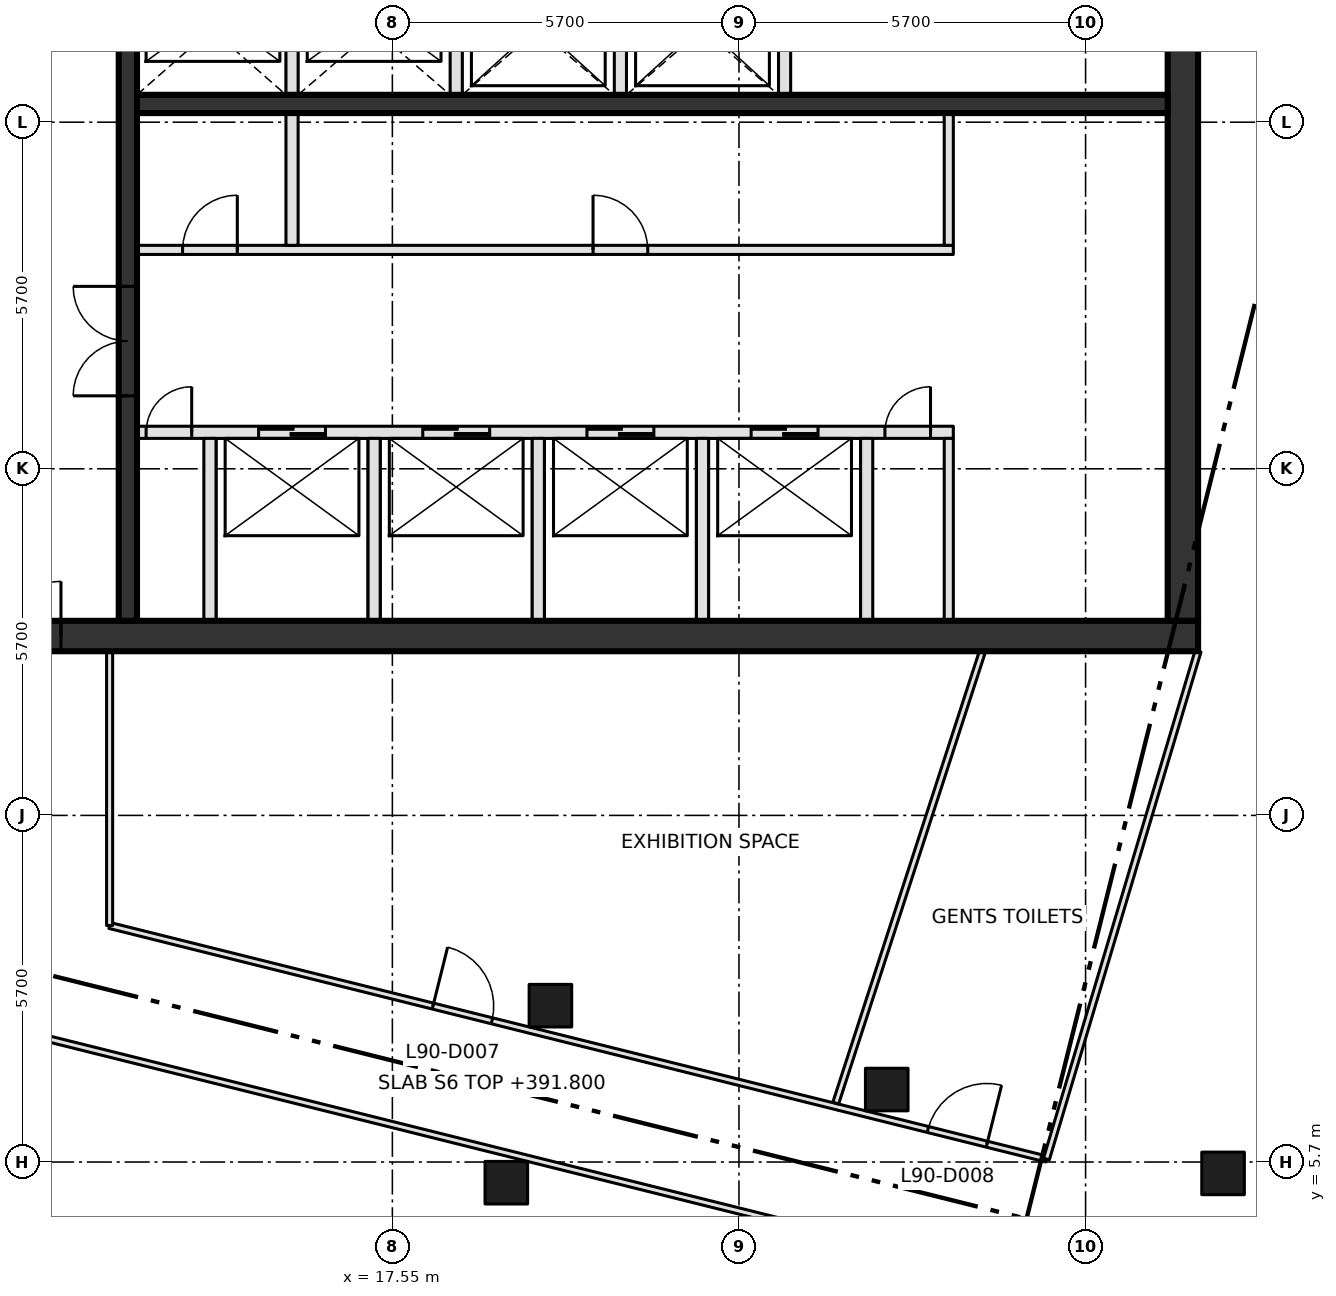
"""IFC4 building model, lengths in metres.
Left out: names, types, materials, properties, quantities, classifications, styles, units other than length and angle.
Written with IfcOpenShell. Run it as: python <this file> out.ifc"""

import sys

from ifc_helpers import new_model, si_unit, direction, frame, frame_2d, origin, origin_2d, place, context, subcontext, project, spatial, rectangle, extrude, element, fill, save


model = new_model("IFC4")
c1 = context("Model", 3, precision=1e-05, world=origin(), true_north=direction((0.0, 1.0)))
c2 = subcontext(c1, "Body", "Model", "MODEL_VIEW")
j1 = project(units=[si_unit("LENGTHUNIT", "METRE"), si_unit("PLANEANGLEUNIT", "RADIAN")], contexts=[c1])
p1 = place(None, origin())
s1 = spatial("IfcSite", under=j1, at=p1, CompositionType="ELEMENT")
p2 = place(p1, origin())
s2 = spatial("IfcBuilding", under=s1, at=p2, CompositionType="ELEMENT")
p3 = place(p2, frame((0.0, 0.0, 391.8)))
s3 = spatial("IfcBuildingStorey", under=s2, at=p3, CompositionType="ELEMENT", Elevation=391.8)
for number, where, z_axis, x_axis in (
    (1, (19.424, 5.36, 0.0), (0.0, 0.0, 1.0), (1.0, 0.0, 0.0)),
    (2, (20.149, 8.271, 0.0), (0.0, 0.0, 1.0), (1.0, 0.0, 0.0)),
    (3, (25.68, 6.892, 0.0), (0.0, 0.0, 1.0), (1.0, 0.0, 0.0)),
    (4, (31.211, 5.513, 0.0), (0.0, 0.0, 1.0), (1.0, 0.0, 0.0)),
):
    element("IfcColumn", number, at=place(p3, frame(where, z_axis=z_axis, x_axis=x_axis)), inside=s3, PredefinedType="COLUMN", context=c2, shape_type="SweptSolid", body=[
        extrude(rectangle(XDim=0.7, YDim=0.7, at=origin_2d()), origin(), (0.0, 0.0, 1.0), 4.2),
    ])
p4 = place(p3, frame((8.0, 14.35, -0.3), z_axis=(0.0, 0.0, 1.0), x_axis=(1.0, 0.0, 0.0)))
e5 = element("IfcWall", 5, at=p4, inside=s3, PredefinedType="SHEAR", context=c2, shape_type="SweptSolid", body=[
    extrude(rectangle(XDim=22.8, YDim=0.5, at=frame_2d((11.4, 0.0))), origin(), (0.0, 0.0, 1.0), 4.2),
])
p5 = place(p4, frame((2.3, 0.0, 0.3)))
e6 = element("IfcOpeningElement", 6, at=p5, cuts=e5, PredefinedType="OPENING", context=c2, shape_type="SweptSolid", body=[
    extrude(rectangle(XDim=1.8, YDim=2.1, at=frame_2d((0.9, 1.05))), frame((0.0, 0.26, 0.0), z_axis=(0.0, -1.0, 0.0), x_axis=(1.0, 0.0, 0.0)), (0.0, 0.0, 1.0), 0.52),
])
p6 = place(p3, frame((30.55, 14.6, -0.3), z_axis=(0.0, 0.0, 1.0), x_axis=(0.0, 1.0, 0.0)))
e7 = element("IfcWall", 7, at=p6, inside=s3, PredefinedType="SHEAR", context=c2, shape_type="SweptSolid", body=[
    extrude(rectangle(XDim=21.1, YDim=0.5, at=frame_2d((10.55, 0.0))), origin(), (0.0, 0.0, 1.0), 4.2),
])
p7 = place(p3, frame((13.35, 17.7, 0.0), z_axis=(0.0, 0.0, 1.0), x_axis=(1.0, 0.0, 0.0)))
e8 = element("IfcWall", 8, at=p7, inside=s3, PredefinedType="SOLIDWALL", context=c2, shape_type="SweptSolid", body=[
    extrude(rectangle(XDim=13.425, YDim=0.2, at=frame_2d((6.712, 0.0))), origin(), (0.0, 0.0, 1.0), 3.9),
])
p8 = place(p7, frame((2.0, 0.0, 0.0)))
e9 = element("IfcOpeningElement", 9, at=p8, cuts=e8, PredefinedType="OPENING", context=c2, shape_type="SweptSolid", body=[
    extrude(rectangle(XDim=1.1, YDim=2.1, at=frame_2d((0.55, 1.05))), frame((0.0, 0.11, 0.0), z_axis=(0.0, -1.0, 0.0), x_axis=(1.0, 0.0, 0.0)), (0.0, 0.0, 1.0), 0.22),
])
p9 = place(p7, frame((4.7, 0.0, 0.0)))
e10 = element("IfcOpeningElement", 10, at=p9, cuts=e8, PredefinedType="OPENING", context=c2, shape_type="SweptSolid", body=[
    extrude(rectangle(XDim=1.1, YDim=2.1, at=frame_2d((0.55, 1.05))), frame((0.0, 0.11, 0.0), z_axis=(0.0, -1.0, 0.0), x_axis=(1.0, 0.0, 0.0)), (0.0, 0.0, 1.0), 0.22),
])
p10 = place(p7, frame((7.4, 0.0, 0.0)))
e11 = element("IfcOpeningElement", 11, at=p10, cuts=e8, PredefinedType="OPENING", context=c2, shape_type="SweptSolid", body=[
    extrude(rectangle(XDim=1.1, YDim=2.1, at=frame_2d((0.55, 1.05))), frame((0.0, 0.11, 0.0), z_axis=(0.0, -1.0, 0.0), x_axis=(1.0, 0.0, 0.0)), (0.0, 0.0, 1.0), 0.22),
])
p11 = place(p7, frame((10.1, 0.0, 0.0)))
e12 = element("IfcOpeningElement", 12, at=p11, cuts=e8, PredefinedType="OPENING", context=c2, shape_type="SweptSolid", body=[
    extrude(rectangle(XDim=1.1, YDim=2.1, at=frame_2d((0.55, 1.05))), frame((0.0, 0.11, 0.0), z_axis=(0.0, -1.0, 0.0), x_axis=(1.0, 0.0, 0.0)), (0.0, 0.0, 1.0), 0.22),
])
p12 = place(p7, frame((0.15, 0.0, 0.0)))
e13 = element("IfcOpeningElement", 13, at=p12, cuts=e8, PredefinedType="OPENING", context=c2, shape_type="SweptSolid", body=[
    extrude(rectangle(XDim=0.75, YDim=2.1, at=frame_2d((0.375, 1.05))), frame((0.0, 0.11, 0.0), z_axis=(0.0, -1.0, 0.0), x_axis=(1.0, 0.0, 0.0)), (0.0, 0.0, 1.0), 0.22),
])
p13 = place(p7, frame((12.3, 0.0, 0.0)))
e14 = element("IfcOpeningElement", 14, at=p13, cuts=e8, PredefinedType="OPENING", context=c2, shape_type="SweptSolid", body=[
    extrude(rectangle(XDim=0.75, YDim=2.1, at=frame_2d((0.375, 1.05))), frame((0.0, 0.11, 0.0), z_axis=(0.0, -1.0, 0.0), x_axis=(1.0, 0.0, 0.0)), (0.0, 0.0, 1.0), 0.22),
])
p14 = place(p3, frame((13.35, 20.7, 0.0), z_axis=(0.0, 0.0, 1.0), x_axis=(1.0, 0.0, 0.0)))
e15 = element("IfcWall", 15, at=p14, inside=s3, PredefinedType="PARTITIONING", context=c2, shape_type="SweptSolid", body=[
    extrude(rectangle(XDim=13.425, YDim=0.15, at=frame_2d((6.712, 0.0))), origin(), (0.0, 0.0, 1.0), 3.9),
])
p15 = place(p14, frame((0.75, 0.0, 0.0)))
e16 = element("IfcOpeningElement", 16, at=p15, cuts=e15, PredefinedType="OPENING", context=c2, shape_type="SweptSolid", body=[
    extrude(rectangle(XDim=0.9, YDim=2.1, at=frame_2d((0.45, 1.05))), frame((0.0, 0.085, 0.0), z_axis=(0.0, -1.0, 0.0), x_axis=(1.0, 0.0, 0.0)), (0.0, 0.0, 1.0), 0.17),
])
p16 = place(p14, frame((7.5, 0.0, 0.0)))
e17 = element("IfcOpeningElement", 17, at=p16, cuts=e15, PredefinedType="OPENING", context=c2, shape_type="SweptSolid", body=[
    extrude(rectangle(XDim=0.9, YDim=2.1, at=frame_2d((0.45, 1.05))), frame((0.0, 0.085, 0.0), z_axis=(0.0, -1.0, 0.0), x_axis=(1.0, 0.0, 0.0)), (0.0, 0.0, 1.0), 0.17),
])
p17 = place(p3, frame((13.35, 23.1, 0.0), z_axis=(0.0, 0.0, 1.0), x_axis=(1.0, 0.0, 0.0)))
e18 = element("IfcWall", 18, at=p17, inside=s3, PredefinedType="SHEAR", context=c2, shape_type="SweptSolid", body=[
    extrude(rectangle(XDim=16.95, YDim=0.3, at=frame_2d((8.475, 0.0))), origin(), (0.0, 0.0, 1.0), 3.9),
])
p18 = place(p3, frame((13.2, 14.6, 0.0), z_axis=(0.0, 0.0, 1.0), x_axis=(0.0, 1.0, 0.0)))
e19 = element("IfcWall", 19, at=p18, inside=s3, PredefinedType="SHEAR", context=c2, shape_type="SweptSolid", body=[
    extrude(rectangle(XDim=21.1, YDim=0.3, at=frame_2d((10.55, 0.0))), origin(), (0.0, 0.0, 1.0), 3.9),
])
p19 = place(p18, frame((3.7, 0.0, 0.0)))
e20 = element("IfcOpeningElement", 20, at=p19, cuts=e19, PredefinedType="OPENING", context=c2, shape_type="SweptSolid", body=[
    extrude(rectangle(XDim=1.8, YDim=2.1, at=frame_2d((0.9, 1.05))), frame((0.0, 0.16, 0.0), z_axis=(0.0, -1.0, 0.0), x_axis=(1.0, 0.0, 0.0)), (0.0, 0.0, 1.0), 0.32),
])
p20 = place(p18, frame((11.8, 0.0, 0.0)))
e21 = element("IfcOpeningElement", 21, at=p20, cuts=e19, PredefinedType="OPENING", context=c2, shape_type="SweptSolid", body=[
    extrude(rectangle(XDim=1.2, YDim=2.1, at=frame_2d((0.6, 1.05))), frame((0.0, 0.16, 0.0), z_axis=(0.0, -1.0, 0.0), x_axis=(1.0, 0.0, 0.0)), (0.0, 0.0, 1.0), 0.32),
])
p21 = place(p3, frame((14.55, 14.6, 0.0), z_axis=(0.0, 0.0, 1.0), x_axis=(0.0, 1.0, 0.0)))
e22 = element("IfcWall", 22, at=p21, inside=s3, PredefinedType="SOLIDWALL", context=c2, shape_type="SweptSolid", body=[
    extrude(rectangle(XDim=3.0, YDim=0.2, at=frame_2d((1.5, 0.0))), origin(), (0.0, 0.0, 1.0), 3.9),
])
p22 = place(p3, frame((15.9, 20.775, 0.0), z_axis=(0.0, 0.0, 1.0), x_axis=(0.0, 1.0, 0.0)))
e23 = element("IfcWall", 23, at=p22, inside=s3, PredefinedType="SOLIDWALL", context=c2, shape_type="SweptSolid", body=[
    extrude(rectangle(XDim=4.625, YDim=0.2, at=frame_2d((2.312, 0.0))), origin(), (0.0, 0.0, 1.0), 3.9),
])
p23 = place(p3, frame((17.25, 14.6, 0.0), z_axis=(0.0, 0.0, 1.0), x_axis=(0.0, 1.0, 0.0)))
e24 = element("IfcWall", 24, at=p23, inside=s3, PredefinedType="SOLIDWALL", context=c2, shape_type="SweptSolid", body=[
    extrude(rectangle(XDim=3.0, YDim=0.2, at=frame_2d((1.5, 0.0))), origin(), (0.0, 0.0, 1.0), 3.9),
])
p24 = place(p3, frame((18.6, 23.25, 0.0), z_axis=(0.0, 0.0, 1.0), x_axis=(0.0, 1.0, 0.0)))
e25 = element("IfcWall", 25, at=p24, inside=s3, PredefinedType="SOLIDWALL", context=c2, shape_type="SweptSolid", body=[
    extrude(rectangle(XDim=5.15, YDim=0.2, at=frame_2d((2.575, 0.0))), origin(), (0.0, 0.0, 1.0), 3.9),
])
p25 = place(p24, frame((3.15, 0.0, 0.0)))
e26 = element("IfcOpeningElement", 26, at=p25, cuts=e25, PredefinedType="OPENING", context=c2, shape_type="SweptSolid", body=[
    extrude(rectangle(XDim=1.2, YDim=2.1, at=frame_2d((0.6, 1.05))), frame((0.0, 0.11, 0.0), z_axis=(0.0, -1.0, 0.0), x_axis=(1.0, 0.0, 0.0)), (0.0, 0.0, 1.0), 0.22),
])
p26 = place(p3, frame((19.95, 14.6, 0.0), z_axis=(0.0, 0.0, 1.0), x_axis=(0.0, 1.0, 0.0)))
e27 = element("IfcWall", 27, at=p26, inside=s3, PredefinedType="SOLIDWALL", context=c2, shape_type="SweptSolid", body=[
    extrude(rectangle(XDim=3.0, YDim=0.2, at=frame_2d((1.5, 0.0))), origin(), (0.0, 0.0, 1.0), 3.9),
])
p27 = place(p3, frame((21.3, 23.25, 0.0), z_axis=(0.0, 0.0, 1.0), x_axis=(0.0, 1.0, 0.0)))
e28 = element("IfcWall", 28, at=p27, inside=s3, PredefinedType="SOLIDWALL", context=c2, shape_type="SweptSolid", body=[
    extrude(rectangle(XDim=2.15, YDim=0.2, at=frame_2d((1.075, 0.0))), origin(), (0.0, 0.0, 1.0), 3.9),
])
p28 = place(p3, frame((22.65, 14.6, 0.0), z_axis=(0.0, 0.0, 1.0), x_axis=(0.0, 1.0, 0.0)))
e29 = element("IfcWall", 29, at=p28, inside=s3, PredefinedType="SOLIDWALL", context=c2, shape_type="SweptSolid", body=[
    extrude(rectangle(XDim=3.0, YDim=0.2, at=frame_2d((1.5, 0.0))), origin(), (0.0, 0.0, 1.0), 3.9),
])
p29 = place(p3, frame((24.0, 23.25, 0.0), z_axis=(0.0, 0.0, 1.0), x_axis=(0.0, 1.0, 0.0)))
e30 = element("IfcWall", 30, at=p29, inside=s3, PredefinedType="SOLIDWALL", context=c2, shape_type="SweptSolid", body=[
    extrude(rectangle(XDim=2.15, YDim=0.2, at=frame_2d((1.075, 0.0))), origin(), (0.0, 0.0, 1.0), 3.9),
])
p30 = place(p3, frame((25.35, 14.6, 0.0), z_axis=(0.0, 0.0, 1.0), x_axis=(0.0, 1.0, 0.0)))
e31 = element("IfcWall", 31, at=p30, inside=s3, PredefinedType="SOLIDWALL", context=c2, shape_type="SweptSolid", body=[
    extrude(rectangle(XDim=3.0, YDim=0.2, at=frame_2d((1.5, 0.0))), origin(), (0.0, 0.0, 1.0), 3.9),
])
p31 = place(p3, frame((26.7, 14.6, 0.0), z_axis=(0.0, 0.0, 1.0), x_axis=(0.0, 1.0, 0.0)))
e32 = element("IfcWall", 32, at=p31, inside=s3, PredefinedType="PARTITIONING", context=c2, shape_type="SweptSolid", body=[
    extrude(rectangle(XDim=3.0, YDim=0.15, at=frame_2d((1.5, 0.0))), origin(), (0.0, 0.0, 1.0), 3.9),
])
p32 = place(p3, frame((26.7, 20.775, 0.0), z_axis=(0.0, 0.0, 1.0), x_axis=(0.0, 1.0, 0.0)))
e33 = element("IfcWall", 33, at=p32, inside=s3, PredefinedType="PARTITIONING", context=c2, shape_type="SweptSolid", body=[
    extrude(rectangle(XDim=2.175, YDim=0.15, at=frame_2d((1.087, 0.0))), origin(), (0.0, 0.0, 1.0), 3.9),
])
p33 = place(p3, frame((8.521, 8.567, 0.0), z_axis=(0.0, 0.0, 1.0), x_axis=(0.970298072542, -0.241912485047, 0.0)))
e34 = element("IfcWall", 34, at=p33, inside=s3, PredefinedType="PARTITIONING", context=c2, shape_type="SweptSolid", body=[
    extrude(rectangle(XDim=39.274, YDim=0.1, at=frame_2d((19.637, 0.0))), origin(), (0.0, 0.0, 1.0), 3.9),
])
p34 = place(p33, frame((24.848, 0.0, 0.0)))
e35 = element("IfcOpeningElement", 35, at=p34, cuts=e34, PredefinedType="OPENING", context=c2, shape_type="SweptSolid", body=[
    extrude(rectangle(XDim=1.8, YDim=2.1, at=frame_2d((0.9, 1.05))), frame((0.0, 0.06, 0.0), z_axis=(0.0, -1.0, 0.0), x_axis=(1.0, 0.0, 0.0)), (0.0, 0.0, 1.0), 0.12),
])
p35 = place(p33, frame((30.448, 0.0, 0.0)))
e36 = element("IfcOpeningElement", 36, at=p35, cuts=e34, PredefinedType="OPENING", context=c2, shape_type="SweptSolid", body=[
    extrude(rectangle(XDim=1.0, YDim=2.1, at=frame_2d((0.5, 1.05))), frame((0.0, 0.06, 0.0), z_axis=(0.0, -1.0, 0.0), x_axis=(1.0, 0.0, 0.0)), (0.0, 0.0, 1.0), 0.12),
])
p36 = place(p3, frame((12.9, 9.59, 0.0), z_axis=(0.0, 0.0, 1.0), x_axis=(0.970296971371, -0.241916901741, 0.0)))
e37 = element("IfcWall", 37, at=p36, inside=s3, PredefinedType="PARTITIONING", context=c2, shape_type="SweptSolid", body=[
    extrude(rectangle(XDim=15.878, YDim=0.1, at=frame_2d((7.939, 0.0))), origin(), (0.0, 0.0, 1.0), 3.9),
])
p37 = place(p36, frame((5.48, 0.0, 0.0)))
e38 = element("IfcOpeningElement", 38, at=p37, cuts=e37, PredefinedType="OPENING", context=c2, shape_type="SweptSolid", body=[
    extrude(rectangle(XDim=1.0, YDim=2.1, at=frame_2d((0.5, 1.05))), frame((0.0, 0.06, 0.0), z_axis=(0.0, -1.0, 0.0), x_axis=(1.0, 0.0, 0.0)), (0.0, 0.0, 1.0), 0.12),
])
p38 = place(p36, frame((13.869, 0.0, 0.0)))
e39 = element("IfcOpeningElement", 39, at=p38, cuts=e37, PredefinedType="OPENING", context=c2, shape_type="SweptSolid", body=[
    extrude(rectangle(XDim=1.0, YDim=2.1, at=frame_2d((0.5, 1.05))), frame((0.0, 0.06, 0.0), z_axis=(0.0, -1.0, 0.0), x_axis=(1.0, 0.0, 0.0)), (0.0, 0.0, 1.0), 0.12),
])
p39 = place(p3, frame((12.9, 9.59, 0.0), z_axis=(0.0, 0.0, 1.0), x_axis=(0.0, 1.0, 0.0)))
e40 = element("IfcWall", 40, at=p39, inside=s3, PredefinedType="PARTITIONING", context=c2, shape_type="SweptSolid", body=[
    extrude(rectangle(XDim=4.51, YDim=0.1, at=frame_2d((2.255, 0.0))), origin(), (0.0, 0.0, 1.0), 3.9),
])
p40 = place(p3, frame((30.8, 14.1, 0.0), z_axis=(0.0, 0.0, 1.0), x_axis=(-0.286170650389, -0.958178667502, 0.0)))
e41 = element("IfcWall", 41, at=p40, inside=s3, PredefinedType="PARTITIONING", context=c2, shape_type="SweptSolid", body=[
    extrude(rectangle(XDim=8.716, YDim=0.1, at=frame_2d((4.358, 0.0))), origin(), (0.0, 0.0, 1.0), 3.9),
])
p41 = place(p3, frame((24.841, 6.668, 0.0), z_axis=(0.0, 0.0, 1.0), x_axis=(0.308898149954, 0.951095122979, 0.0)))
e42 = element("IfcWall", 42, at=p41, inside=s3, PredefinedType="PARTITIONING", context=c2, shape_type="SweptSolid", body=[
    extrude(rectangle(XDim=7.814, YDim=0.1, at=frame_2d((3.907, 0.0))), origin(), (0.0, 0.0, 1.0), 3.9),
])
p42 = place(p8, origin())
e43 = element("IfcDoor", 43, at=p42, inside=s3, OperationType="SLIDING_TO_LEFT", PredefinedType="DOOR", context=c2, shape_type="SweptSolid", body=[
    extrude(rectangle(XDim=1.1, YDim=2.1, at=frame_2d((0.55, 1.05))), frame((0.0, 0.025, 0.0), z_axis=(0.0, -1.0, 0.0), x_axis=(1.0, 0.0, 0.0)), (0.0, 0.0, 1.0), 0.05),
])
fill(e9, e43)
p43 = place(p9, origin())
e44 = element("IfcDoor", 44, at=p43, inside=s3, OperationType="SLIDING_TO_LEFT", PredefinedType="DOOR", context=c2, shape_type="SweptSolid", body=[
    extrude(rectangle(XDim=1.1, YDim=2.1, at=frame_2d((0.55, 1.05))), frame((0.0, 0.025, 0.0), z_axis=(0.0, -1.0, 0.0), x_axis=(1.0, 0.0, 0.0)), (0.0, 0.0, 1.0), 0.05),
])
fill(e10, e44)
p44 = place(p10, origin())
e45 = element("IfcDoor", 45, at=p44, inside=s3, OperationType="SLIDING_TO_LEFT", PredefinedType="DOOR", context=c2, shape_type="SweptSolid", body=[
    extrude(rectangle(XDim=1.1, YDim=2.1, at=frame_2d((0.55, 1.05))), frame((0.0, 0.025, 0.0), z_axis=(0.0, -1.0, 0.0), x_axis=(1.0, 0.0, 0.0)), (0.0, 0.0, 1.0), 0.05),
])
fill(e11, e45)
p45 = place(p11, origin())
e46 = element("IfcDoor", 46, at=p45, inside=s3, OperationType="SLIDING_TO_LEFT", PredefinedType="DOOR", context=c2, shape_type="SweptSolid", body=[
    extrude(rectangle(XDim=1.1, YDim=2.1, at=frame_2d((0.55, 1.05))), frame((0.0, 0.025, 0.0), z_axis=(0.0, -1.0, 0.0), x_axis=(1.0, 0.0, 0.0)), (0.0, 0.0, 1.0), 0.05),
])
fill(e12, e46)
p46 = place(p12, origin())
e47 = element("IfcDoor", 47, at=p46, inside=s3, OperationType="SINGLE_SWING_RIGHT", PredefinedType="DOOR", context=c2, shape_type="SweptSolid", body=[
    extrude(rectangle(XDim=0.75, YDim=2.1, at=frame_2d((0.375, 1.05))), frame((0.0, 0.025, 0.0), z_axis=(0.0, -1.0, 0.0), x_axis=(1.0, 0.0, 0.0)), (0.0, 0.0, 1.0), 0.05),
])
fill(e13, e47)
p47 = place(p13, origin())
e48 = element("IfcDoor", 48, at=p47, inside=s3, OperationType="SINGLE_SWING_RIGHT", PredefinedType="DOOR", context=c2, shape_type="SweptSolid", body=[
    extrude(rectangle(XDim=0.75, YDim=2.1, at=frame_2d((0.375, 1.05))), frame((0.0, 0.025, 0.0), z_axis=(0.0, -1.0, 0.0), x_axis=(1.0, 0.0, 0.0)), (0.0, 0.0, 1.0), 0.05),
])
fill(e14, e48)
p48 = place(p15, origin())
e49 = element("IfcDoor", 49, at=p48, inside=s3, OperationType="SINGLE_SWING_RIGHT", PredefinedType="DOOR", context=c2, shape_type="SweptSolid", body=[
    extrude(rectangle(XDim=0.9, YDim=2.1, at=frame_2d((0.45, 1.05))), frame((0.0, 0.025, 0.0), z_axis=(0.0, -1.0, 0.0), x_axis=(1.0, 0.0, 0.0)), (0.0, 0.0, 1.0), 0.05),
])
fill(e16, e49)
p49 = place(p16, origin())
e50 = element("IfcDoor", 50, at=p49, inside=s3, OperationType="SINGLE_SWING_LEFT", PredefinedType="DOOR", context=c2, shape_type="SweptSolid", body=[
    extrude(rectangle(XDim=0.9, YDim=2.1, at=frame_2d((0.45, 1.05))), frame((0.0, 0.025, 0.0), z_axis=(0.0, -1.0, 0.0), x_axis=(1.0, 0.0, 0.0)), (0.0, 0.0, 1.0), 0.05),
])
fill(e17, e50)
p50 = place(p19, origin())
e51 = element("IfcDoor", 51, at=p50, inside=s3, OperationType="DOUBLE_DOOR_SINGLE_SWING", PredefinedType="DOOR", context=c2, shape_type="SweptSolid", body=[
    extrude(rectangle(XDim=1.8, YDim=2.1, at=frame_2d((0.9, 1.05))), frame((0.0, 0.025, 0.0), z_axis=(0.0, -1.0, 0.0), x_axis=(1.0, 0.0, 0.0)), (0.0, 0.0, 1.0), 0.05),
])
fill(e20, e51)
p51 = place(p5, origin())
e52 = element("IfcDoor", 52, at=p51, inside=s3, OperationType="DOUBLE_DOOR_SINGLE_SWING", PredefinedType="DOOR", context=c2, shape_type="SweptSolid", body=[
    extrude(rectangle(XDim=1.8, YDim=2.1, at=frame_2d((0.9, 1.05))), frame((0.0, 0.025, 0.0), z_axis=(0.0, -1.0, 0.0), x_axis=(1.0, 0.0, 0.0)), (0.0, 0.0, 1.0), 0.05),
])
fill(e6, e52)
p52 = place(p37, origin())
e53 = element("IfcDoor", 53, at=p52, inside=s3, OperationType="SINGLE_SWING_LEFT", PredefinedType="DOOR", context=c2, shape_type="SweptSolid", body=[
    extrude(rectangle(XDim=1.0, YDim=2.1, at=frame_2d((0.5, 1.05))), frame((0.0, 0.025, 0.0), z_axis=(0.0, -1.0, 0.0), x_axis=(1.0, 0.0, 0.0)), (0.0, 0.0, 1.0), 0.05),
])
fill(e38, e53)
p53 = place(p38, origin())
e54 = element("IfcDoor", 54, at=p53, inside=s3, OperationType="SINGLE_SWING_RIGHT", PredefinedType="DOOR", context=c2, shape_type="SweptSolid", body=[
    extrude(rectangle(XDim=1.0, YDim=2.1, at=frame_2d((0.5, 1.05))), frame((0.0, 0.025, 0.0), z_axis=(0.0, -1.0, 0.0), x_axis=(1.0, 0.0, 0.0)), (0.0, 0.0, 1.0), 0.05),
])
fill(e39, e54)
save(model, sys.argv[1])
